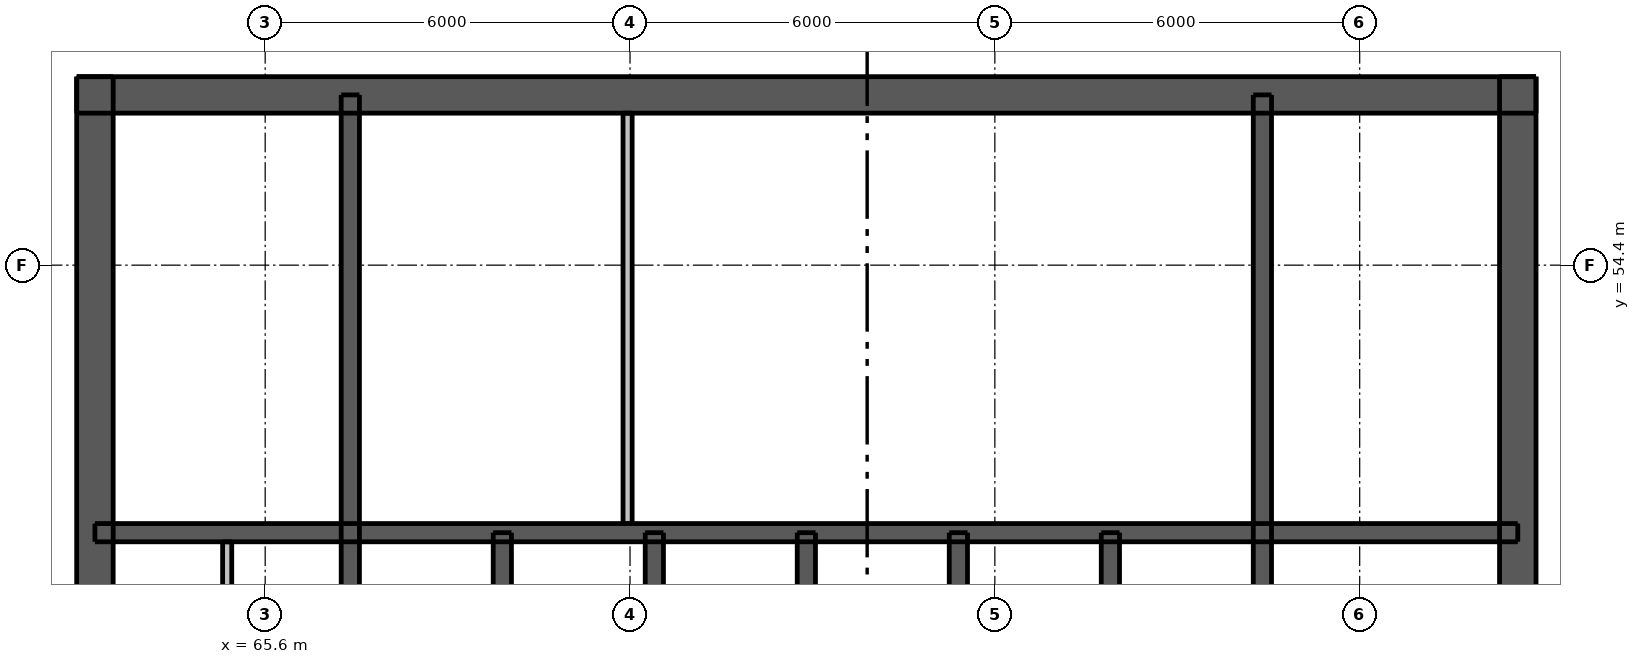
"""IFC4 building model, lengths in metres.
Left out: names, types, materials, properties, quantities, classifications, styles, units other than length and angle.
Written with IfcOpenShell. Run it as: python <this file> out.ifc"""

import sys

from ifc_helpers import new_model, si_unit, direction, frame, frame_2d, origin, place, context, subcontext, project, spatial, rectangle, extrude, element, fill, save


model = new_model("IFC4")
c1 = context("Model", 3, precision=1e-05, world=origin(), true_north=direction((0.0, 1.0)))
c2 = subcontext(c1, "Body", "Model", "MODEL_VIEW")
j1 = project(units=[si_unit("LENGTHUNIT", "METRE"), si_unit("PLANEANGLEUNIT", "RADIAN")], contexts=[c1])
p1 = place(None, origin())
s1 = spatial("IfcSite", under=j1, at=p1, CompositionType="ELEMENT")
p2 = place(p1, origin())
s2 = spatial("IfcBuilding", under=s1, at=p2, CompositionType="ELEMENT")
p3 = place(p2, frame((0.0, 0.0, 200.2)))
s3 = spatial("IfcBuildingStorey", under=s2, at=p3, CompositionType="ELEMENT", Elevation=200.2)
p4 = place(p3, frame((62.5, 57.2, 0.0), z_axis=(0.0, 0.0, 1.0), x_axis=(1.0, 0.0, 0.0)))
e1 = element("IfcWall", 1, at=p4, inside=s3, PredefinedType="SHEAR", context=c2, shape_type="SweptSolid", body=[
    extrude(rectangle(XDim=24.0, YDim=0.6, at=frame_2d((12.0, 0.0))), origin(), (0.0, 0.0, 1.0), 3.05),
])
p5 = place(p4, frame((20.975, 0.0, 0.0)))
e2 = element("IfcOpeningElement", 2, at=p5, cuts=e1, PredefinedType="OPENING", context=c2, shape_type="SweptSolid", body=[
    extrude(rectangle(XDim=1.1, YDim=2.1, at=frame_2d((0.55, 1.05))), frame((0.0, 0.31, 0.0), z_axis=(0.0, -1.0, 0.0), x_axis=(1.0, 0.0, 0.0)), (0.0, 0.0, 1.0), 0.62),
])
p6 = place(p4, frame((1.925, 0.0, 0.0)))
e3 = element("IfcOpeningElement", 3, at=p6, cuts=e1, PredefinedType="OPENING", context=c2, shape_type="SweptSolid", body=[
    extrude(rectangle(XDim=1.1, YDim=2.1, at=frame_2d((0.55, 1.05))), frame((0.0, 0.31, 0.0), z_axis=(0.0, -1.0, 0.0), x_axis=(1.0, 0.0, 0.0)), (0.0, 0.0, 1.0), 0.62),
])
p7 = place(p4, frame((6.405, 0.0, 0.0)))
e4 = element("IfcOpeningElement", 4, at=p7, cuts=e1, PredefinedType="OPENING", context=c2, shape_type="SweptSolid", body=[
    extrude(rectangle(XDim=0.9, YDim=2.1, at=frame_2d((0.45, 1.05))), frame((0.0, 0.31, 0.0), z_axis=(0.0, -1.0, 0.0), x_axis=(1.0, 0.0, 0.0)), (0.0, 0.0, 1.0), 0.62),
])
p8 = place(p4, frame((13.755, 0.0, 0.0)))
e5 = element("IfcOpeningElement", 5, at=p8, cuts=e1, PredefinedType="OPENING", context=c2, shape_type="SweptSolid", body=[
    extrude(rectangle(XDim=0.9, YDim=2.1, at=frame_2d((0.45, 1.05))), frame((0.0, 0.31, 0.0), z_axis=(0.0, -1.0, 0.0), x_axis=(1.0, 0.0, 0.0)), (0.0, 0.0, 1.0), 0.62),
])
p9 = place(p3, frame((62.8, 33.5, 0.0), z_axis=(0.0, 0.0, 1.0), x_axis=(0.0, 1.0, 0.0)))
e6 = element("IfcWall", 6, at=p9, inside=s3, PredefinedType="SHEAR", context=c2, shape_type="SweptSolid", body=[
    extrude(rectangle(XDim=24.0, YDim=0.6, at=frame_2d((12.0, 0.0))), origin(), (0.0, 0.0, 1.0), 3.05),
])
p10 = place(p9, frame((11.2, 0.0, 0.0)))
e7 = element("IfcOpeningElement", 7, at=p10, cuts=e6, PredefinedType="OPENING", context=c2, shape_type="SweptSolid", body=[
    extrude(rectangle(XDim=1.6, YDim=2.1, at=frame_2d((0.8, 1.05))), frame((0.0, 0.31, 0.0), z_axis=(0.0, -1.0, 0.0), x_axis=(1.0, 0.0, 0.0)), (0.0, 0.0, 1.0), 0.62),
])
p11 = place(p3, frame((86.2, 33.5, 0.0), z_axis=(0.0, 0.0, 1.0), x_axis=(0.0, 1.0, 0.0)))
e8 = element("IfcWall", 8, at=p11, inside=s3, PredefinedType="SHEAR", context=c2, shape_type="SweptSolid", body=[
    extrude(rectangle(XDim=24.0, YDim=0.6, at=frame_2d((12.0, 0.0))), origin(), (0.0, 0.0, 1.0), 3.05),
])
p12 = place(p11, frame((11.2, 0.0, 0.0)))
e9 = element("IfcOpeningElement", 9, at=p12, cuts=e8, PredefinedType="OPENING", context=c2, shape_type="SweptSolid", body=[
    extrude(rectangle(XDim=1.6, YDim=2.1, at=frame_2d((0.8, 1.05))), frame((0.0, 0.31, 0.0), z_axis=(0.0, -1.0, 0.0), x_axis=(1.0, 0.0, 0.0)), (0.0, 0.0, 1.0), 0.62),
])
p13 = place(p3, frame((62.8, 50.0, 0.0), z_axis=(0.0, 0.0, 1.0), x_axis=(1.0, 0.0, 0.0)))
e10 = element("IfcWall", 10, at=p13, inside=s3, PredefinedType="SHEAR", context=c2, shape_type="SweptSolid", body=[
    extrude(rectangle(XDim=23.4, YDim=0.3, at=frame_2d((11.7, 0.0))), origin(), (0.0, 0.0, 1.0), 3.05),
])
for number, where, z_axis, x_axis in (
    (11, (67.0, 47.1, 0.0), (0.0, 0.0, 1.0), (0.0, 1.0, 0.0)),
    (12, (82.0, 47.1, 0.0), (0.0, 0.0, 1.0), (0.0, 1.0, 0.0)),
):
    element("IfcWall", number, at=place(p3, frame(where, z_axis=z_axis, x_axis=x_axis)), inside=s3, PredefinedType="SHEAR", context=c2, shape_type="SweptSolid", body=[
        extrude(rectangle(XDim=10.1, YDim=0.3, at=frame_2d((5.05, 0.0))), origin(), (0.0, 0.0, 1.0), 3.05),
    ])
for number, where, z_axis, x_axis in (
    (13, (69.5, 47.1, 0.0), (0.0, 0.0, 1.0), (0.0, 1.0, 0.0)),
    (14, (72.0, 47.1, 0.0), (0.0, 0.0, 1.0), (0.0, 1.0, 0.0)),
    (15, (74.5, 47.1, 0.0), (0.0, 0.0, 1.0), (0.0, 1.0, 0.0)),
    (16, (77.0, 47.1, 0.0), (0.0, 0.0, 1.0), (0.0, 1.0, 0.0)),
    (17, (79.5, 47.1, 0.0), (0.0, 0.0, 1.0), (0.0, 1.0, 0.0)),
):
    element("IfcWall", number, at=place(p3, frame(where, z_axis=z_axis, x_axis=x_axis)), inside=s3, PredefinedType="SHEAR", context=c2, shape_type="SweptSolid", body=[
        extrude(rectangle(XDim=2.9, YDim=0.3, at=frame_2d((1.45, 0.0))), origin(), (0.0, 0.0, 1.0), 3.05),
    ])
p14 = place(p3, frame((64.975, 47.25, 0.0), z_axis=(0.0, 0.0, 1.0), x_axis=(0.0, 1.0, 0.0)))
e18 = element("IfcWall", 18, at=p14, inside=s3, PredefinedType="PLUMBINGWALL", context=c2, shape_type="SweptSolid", body=[
    extrude(rectangle(XDim=2.6, YDim=0.15, at=frame_2d((1.3, 0.0))), origin(), (0.0, 0.0, 1.0), 3.05),
])
p15 = place(p3, frame((71.56, 50.15, 0.0), z_axis=(0.0, 0.0, 1.0), x_axis=(0.0, 1.0, 0.0)))
e19 = element("IfcWall", 19, at=p15, inside=s3, PredefinedType="PLUMBINGWALL", context=c2, shape_type="SweptSolid", body=[
    extrude(rectangle(XDim=6.75, YDim=0.15, at=frame_2d((3.375, 0.0))), origin(), (0.0, 0.0, 1.0), 3.05),
])
p16 = place(p5, origin())
e20 = element("IfcDoor", 20, at=p16, inside=s3, OperationType="SINGLE_SWING_RIGHT", PredefinedType="DOOR", context=c2, shape_type="SweptSolid", body=[
    extrude(rectangle(XDim=1.1, YDim=2.1, at=frame_2d((0.55, 1.05))), frame((0.0, -0.237, 0.0), z_axis=(0.0, -1.0, 0.0), x_axis=(1.0, 0.0, 0.0)), (0.0, 0.0, 1.0), 0.05),
])
fill(e2, e20)
p17 = place(p6, origin())
e21 = element("IfcDoor", 21, at=p17, inside=s3, OperationType="SINGLE_SWING_LEFT", PredefinedType="DOOR", context=c2, shape_type="SweptSolid", body=[
    extrude(rectangle(XDim=1.1, YDim=2.1, at=frame_2d((0.55, 1.05))), frame((0.0, -0.237, 0.0), z_axis=(0.0, -1.0, 0.0), x_axis=(1.0, 0.0, 0.0)), (0.0, 0.0, 1.0), 0.05),
])
fill(e3, e21)
p18 = place(p7, origin())
e22 = element("IfcDoor", 22, at=p18, inside=s3, OperationType="SINGLE_SWING_RIGHT", PredefinedType="DOOR", context=c2, shape_type="SweptSolid", body=[
    extrude(rectangle(XDim=0.9, YDim=2.1, at=frame_2d((0.45, 1.05))), frame((0.0, -0.237, 0.0), z_axis=(0.0, -1.0, 0.0), x_axis=(1.0, 0.0, 0.0)), (0.0, 0.0, 1.0), 0.05),
])
fill(e4, e22)
p19 = place(p8, origin())
e23 = element("IfcDoor", 23, at=p19, inside=s3, OperationType="SINGLE_SWING_RIGHT", PredefinedType="DOOR", context=c2, shape_type="SweptSolid", body=[
    extrude(rectangle(XDim=0.9, YDim=2.1, at=frame_2d((0.45, 1.05))), frame((0.0, -0.237, 0.0), z_axis=(0.0, -1.0, 0.0), x_axis=(1.0, 0.0, 0.0)), (0.0, 0.0, 1.0), 0.05),
])
fill(e5, e23)
save(model, sys.argv[1])
